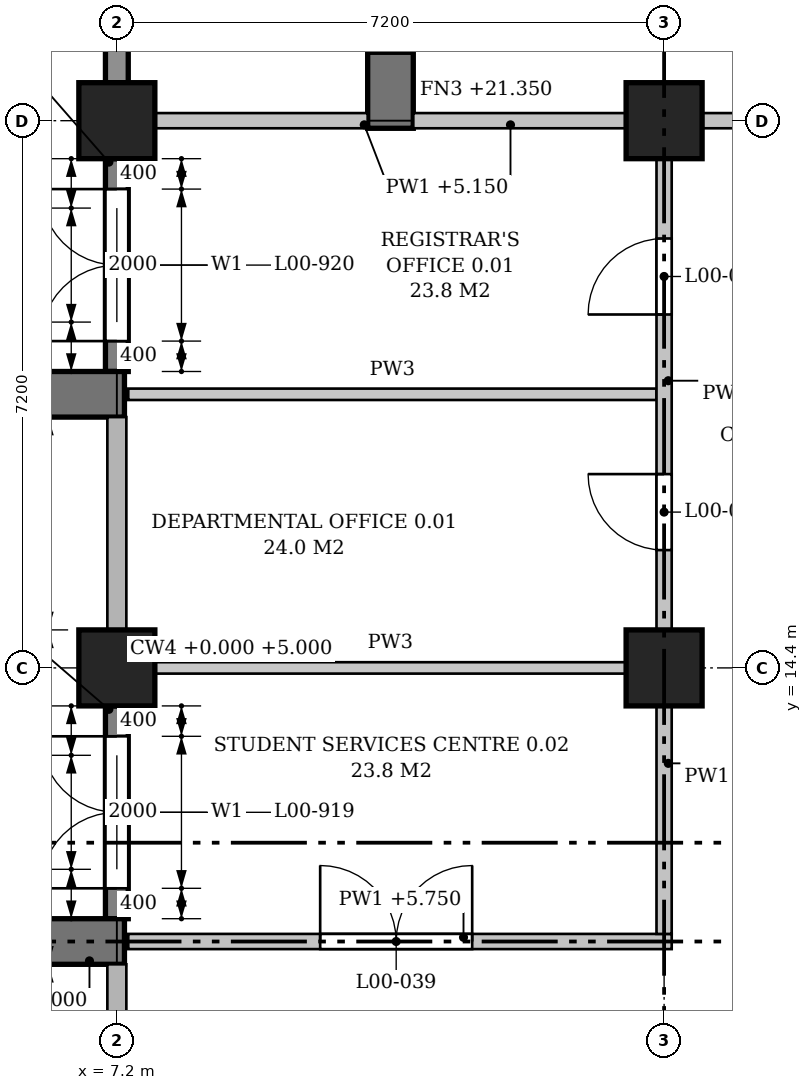
"""IFC4 building model, lengths in metres.
Left out: names, types, materials, properties, quantities, classifications, styles, units other than length and angle.
Written with IfcOpenShell. Run it as: python <this file> out.ifc"""

import sys

from ifc_helpers import new_model, si_unit, direction, frame, frame_2d, origin, origin_2d, place, context, subcontext, project, spatial, polyline, rectangle, outline, extrude, element, fill, save


model = new_model("IFC4")
c1 = context("Model", 3, precision=1e-05, world=origin(), true_north=direction((0.0, 1.0)))
c2 = subcontext(c1, "Body", "Model", "MODEL_VIEW")
j1 = project(units=[si_unit("LENGTHUNIT", "METRE"), si_unit("PLANEANGLEUNIT", "RADIAN")], contexts=[c1])
p1 = place(None, origin())
s1 = spatial("IfcSite", under=j1, at=p1, CompositionType="ELEMENT")
p2 = place(p1, origin())
s2 = spatial("IfcBuilding", under=s1, at=p2, CompositionType="ELEMENT")
p3 = place(p2, origin())
s3 = spatial("IfcBuildingStorey", under=s2, at=p3, CompositionType="ELEMENT", Elevation=0.0)
for number, where, z_axis, x_axis in (
    (1, (7.2, 14.4, 0.0), (0.0, 0.0, 1.0), (1.0, 0.0, 0.0)),
    (2, (7.2, 21.6, 0.0), (0.0, 0.0, 1.0), (1.0, 0.0, 0.0)),
    (3, (14.4, 14.4, 0.0), (0.0, 0.0, 1.0), (1.0, 0.0, 0.0)),
    (4, (14.4, 21.6, 0.0), (0.0, 0.0, 1.0), (1.0, 0.0, 0.0)),
):
    element("IfcColumn", number, at=place(p3, frame(where, z_axis=z_axis, x_axis=x_axis)), inside=s3, PredefinedType="COLUMN", context=c2, shape_type="SweptSolid", body=[
        extrude(rectangle(XDim=1.0, YDim=1.0, at=origin_2d()), origin(), (0.0, 0.0, 1.0), 6.0),
    ])
p4 = place(p3, frame((7.2, 11.1, 0.0), z_axis=(0.0, 0.0, 1.0), x_axis=(0.0, 1.0, 0.0)))
e5 = element("IfcWall", 5, at=p4, inside=s3, PredefinedType="STANDARD", context=c2, shape_type="SweptSolid", body=[
    extrude(rectangle(XDim=2.8, YDim=0.3, at=frame_2d((1.4, 0.0))), origin(), (0.0, 0.0, 1.0), 5.0),
])
p5 = place(p4, frame((0.4, 0.0, 0.0)))
e6 = element("IfcOpeningElement", 6, at=p5, cuts=e5, PredefinedType="OPENING", context=c2, shape_type="SweptSolid", body=[
    extrude(outline(polyline([(0.0, 0.0), (2.0, 0.0), (2.0, 1.9), (1.0, 2.9), (0.0, 1.9), (0.0, 0.0)])), frame((0.0, 0.16, 0.0), z_axis=(0.0, -1.0, 0.0), x_axis=(1.0, 0.0, 0.0)), (0.0, 0.0, 1.0), 0.32),
])
p6 = place(p4, frame((0.65, 0.0, 3.15)))
e7 = element("IfcOpeningElement", 7, at=p6, cuts=e5, PredefinedType="OPENING", context=c2, shape_type="SweptSolid", body=[
    extrude(outline(polyline([(0.0, 0.0), (1.5, 0.0), (1.5, 1.05), (0.75, 1.8), (0.0, 1.05), (0.0, 0.0)])), frame((0.0, 0.16, 0.0), z_axis=(0.0, -1.0, 0.0), x_axis=(1.0, 0.0, 0.0)), (0.0, 0.0, 1.0), 0.32),
])
p7 = place(p3, frame((7.2, 18.3, 0.0), z_axis=(0.0, 0.0, 1.0), x_axis=(0.0, 1.0, 0.0)))
e8 = element("IfcWall", 8, at=p7, inside=s3, PredefinedType="STANDARD", context=c2, shape_type="SweptSolid", body=[
    extrude(rectangle(XDim=2.8, YDim=0.3, at=frame_2d((1.4, 0.0))), origin(), (0.0, 0.0, 1.0), 5.0),
])
p8 = place(p7, frame((0.4, 0.0, 0.0)))
e9 = element("IfcOpeningElement", 9, at=p8, cuts=e8, PredefinedType="OPENING", context=c2, shape_type="SweptSolid", body=[
    extrude(outline(polyline([(0.0, 0.0), (2.0, 0.0), (2.0, 1.9), (1.0, 2.9), (0.0, 1.9), (0.0, 0.0)])), frame((0.0, 0.16, 0.0), z_axis=(0.0, -1.0, 0.0), x_axis=(1.0, 0.0, 0.0)), (0.0, 0.0, 1.0), 0.32),
])
p9 = place(p7, frame((0.65, 0.0, 3.15)))
e10 = element("IfcOpeningElement", 10, at=p9, cuts=e8, PredefinedType="OPENING", context=c2, shape_type="SweptSolid", body=[
    extrude(outline(polyline([(0.0, 0.0), (1.5, 0.0), (1.5, 1.05), (0.75, 1.8), (0.0, 1.05), (0.0, 0.0)])), frame((0.0, 0.16, 0.0), z_axis=(0.0, -1.0, 0.0), x_axis=(1.0, 0.0, 0.0)), (0.0, 0.0, 1.0), 0.32),
])
p10 = place(p3, frame((7.2, 22.1, 0.0), z_axis=(0.0, 0.0, 1.0), x_axis=(0.0, 1.0, 0.0)))
e11 = element("IfcWall", 11, at=p10, inside=s3, PredefinedType="SOLIDWALL", context=c2, shape_type="SweptSolid", body=[
    extrude(rectangle(XDim=2.8, YDim=0.3, at=frame_2d((1.4, 0.0))), origin(), (0.0, 0.0, 1.0), 5.75),
])
p11 = place(p3, frame((10.8, 21.5, 0.0), z_axis=(0.0, 0.0, 1.0), x_axis=(0.0, 1.0, 0.0)))
e12 = element("IfcWall", 12, at=p11, inside=s3, PredefinedType="POLYGONAL", context=c2, shape_type="SweptSolid", body=[
    extrude(outline(polyline([(1.0, 0.0), (1.0, 20.975), (0.75, 21.35), (0.35, 21.35), (0.35, 20.75), (0.0, 20.75), (0.0, 16.8), (0.35, 16.8), (0.35, 15.95), (0.0, 15.95), (0.0, 11.4), (0.35, 11.4), (0.35, 10.55), (0.0, 10.55), (0.0, 6.0), (0.35, 6.0), (0.35, 0.0), (1.0, 0.0)])), frame((0.0, 0.3, 0.0), z_axis=(0.0, -1.0, 0.0), x_axis=(1.0, 0.0, 0.0)), (0.0, 0.0, 1.0), 0.6),
])
for number, where, z_axis, x_axis in (
    (13, (7.3, 10.8, 0.0), (0.0, 0.0, 1.0), (-1.0, 0.0, 0.0)),
    (14, (7.3, 18.0, 0.0), (0.0, 0.0, 1.0), (-1.0, 0.0, 0.0)),
):
    element("IfcWall", number, at=place(p3, frame(where, z_axis=z_axis, x_axis=x_axis)), inside=s3, PredefinedType="POLYGONAL", context=c2, shape_type="SweptSolid", body=[
        extrude(outline(polyline([(1.0, 0.0), (1.0, 5.25), (0.5, 6.0), (0.35, 6.0), (0.35, 5.0), (0.0, 5.0), (0.0, 0.0), (1.0, 0.0)])), frame((0.0, 0.3, 0.0), z_axis=(0.0, -1.0, 0.0), x_axis=(1.0, 0.0, 0.0)), (0.0, 0.0, 1.0), 0.6),
    ])
p12 = place(p3, frame((7.35, 10.8, 0.0), z_axis=(0.0, 0.0, 1.0), x_axis=(1.0, 0.0, 0.0)))
e15 = element("IfcWall", 15, at=p12, inside=s3, PredefinedType="PARTITIONING", context=c2, shape_type="SweptSolid", body=[
    extrude(outline(polyline([(0.0, 0.0), (7.15, 0.0), (7.15, 5.0), (6.8, 5.0), (6.8, 5.75), (0.1, 5.75), (0.1, 5.0), (0.0, 5.0), (0.0, 0.0)])), frame((0.0, 0.1, 0.0), z_axis=(0.0, -1.0, 0.0), x_axis=(1.0, 0.0, 0.0)), (0.0, 0.0, 1.0), 0.2),
])
p13 = place(p12, frame((2.525, 0.0, 0.0)))
e16 = element("IfcOpeningElement", 16, at=p13, cuts=e15, PredefinedType="OPENING", context=c2, shape_type="SweptSolid", body=[
    extrude(rectangle(XDim=2.0, YDim=2.1, at=frame_2d((1.0, 1.05))), frame((0.0, 0.11, 0.0), z_axis=(0.0, -1.0, 0.0), x_axis=(1.0, 0.0, 0.0)), (0.0, 0.0, 1.0), 0.22),
])
p14 = place(p3, frame((7.7, 14.4, 0.0), z_axis=(0.0, 0.0, 1.0), x_axis=(1.0, 0.0, 0.0)))
e17 = element("IfcWall", 17, at=p14, inside=s3, PredefinedType="PARTITIONING", context=c2, shape_type="SweptSolid", body=[
    extrude(rectangle(XDim=6.2, YDim=0.15, at=frame_2d((3.1, 0.0))), origin(), (0.0, 0.0, 1.0), 5.0),
])
p15 = place(p3, frame((7.35, 18.0, 0.0), z_axis=(0.0, 0.0, 1.0), x_axis=(1.0, 0.0, 0.0)))
e18 = element("IfcWall", 18, at=p15, inside=s3, PredefinedType="PARTITIONING", context=c2, shape_type="SweptSolid", body=[
    extrude(rectangle(XDim=6.95, YDim=0.15, at=frame_2d((3.475, 0.0))), origin(), (0.0, 0.0, 1.0), 5.0),
])
p16 = place(p3, frame((7.7, 21.6, 0.0), z_axis=(0.0, 0.0, 1.0), x_axis=(1.0, 0.0, 0.0)))
e19 = element("IfcWall", 19, at=p16, inside=s3, PredefinedType="PARTITIONING", context=c2, shape_type="SweptSolid", body=[
    extrude(rectangle(XDim=2.8, YDim=0.2, at=frame_2d((1.4, 0.0))), origin(), (0.0, 0.0, 1.0), 5.15),
])
p17 = place(p3, frame((11.1, 21.6, 0.0), z_axis=(0.0, 0.0, 1.0), x_axis=(1.0, 0.0, 0.0)))
e20 = element("IfcWall", 20, at=p17, inside=s3, PredefinedType="PARTITIONING", context=c2, shape_type="SweptSolid", body=[
    extrude(rectangle(XDim=2.8, YDim=0.2, at=frame_2d((1.4, 0.0))), origin(), (0.0, 0.0, 1.0), 5.15),
])
p18 = place(p3, frame((14.9, 21.6, 0.0), z_axis=(0.0, 0.0, 1.0), x_axis=(1.0, 0.0, 0.0)))
e21 = element("IfcWall", 21, at=p18, inside=s3, PredefinedType="PARTITIONING", context=c2, shape_type="SweptSolid", body=[
    extrude(rectangle(XDim=2.8, YDim=0.2, at=frame_2d((1.4, 0.0))), origin(), (0.0, 0.0, 1.0), 5.15),
])
p19 = place(p18, frame((0.9, 0.0, 0.0)))
e22 = element("IfcOpeningElement", 22, at=p19, cuts=e21, PredefinedType="OPENING", context=c2, shape_type="SweptSolid", body=[
    extrude(rectangle(XDim=1.0, YDim=2.1, at=frame_2d((0.5, 1.05))), frame((0.0, 0.11, 0.0), z_axis=(0.0, -1.0, 0.0), x_axis=(1.0, 0.0, 0.0)), (0.0, 0.0, 1.0), 0.22),
])
p20 = place(p3, frame((14.4, 10.9, 0.0), z_axis=(0.0, 0.0, 1.0), x_axis=(0.0, 1.0, 0.0)))
e23 = element("IfcWall", 23, at=p20, inside=s3, PredefinedType="PARTITIONING", context=c2, shape_type="SweptSolid", body=[
    extrude(rectangle(XDim=3.0, YDim=0.2, at=frame_2d((1.5, 0.0))), origin(), (0.0, 0.0, 1.0), 5.0),
])
p21 = place(p3, frame((14.4, 14.9, 0.0), z_axis=(0.0, 0.0, 1.0), x_axis=(0.0, 1.0, 0.0)))
e24 = element("IfcWall", 24, at=p21, inside=s3, PredefinedType="PARTITIONING", context=c2, shape_type="SweptSolid", body=[
    extrude(rectangle(XDim=6.2, YDim=0.2, at=frame_2d((3.1, 0.0))), origin(), (0.0, 0.0, 1.0), 5.0),
])
p22 = place(p21, frame((4.15, 0.0, 0.0)))
e25 = element("IfcOpeningElement", 25, at=p22, cuts=e24, PredefinedType="OPENING", context=c2, shape_type="SweptSolid", body=[
    extrude(rectangle(XDim=1.0, YDim=2.1, at=frame_2d((0.5, 1.05))), frame((0.0, 0.11, 0.0), z_axis=(0.0, -1.0, 0.0), x_axis=(1.0, 0.0, 0.0)), (0.0, 0.0, 1.0), 0.22),
])
p23 = place(p21, frame((1.05, 0.0, 0.0)))
e26 = element("IfcOpeningElement", 26, at=p23, cuts=e24, PredefinedType="OPENING", context=c2, shape_type="SweptSolid", body=[
    extrude(rectangle(XDim=1.0, YDim=2.1, at=frame_2d((0.5, 1.05))), frame((0.0, 0.11, 0.0), z_axis=(0.0, -1.0, 0.0), x_axis=(1.0, 0.0, 0.0)), (0.0, 0.0, 1.0), 0.22),
])
p24 = place(p5, origin())
e27 = element("IfcDoor", 27, at=p24, inside=s3, OperationType="DOUBLE_DOOR_SINGLE_SWING", PredefinedType="DOOR", context=c2, shape_type="SweptSolid", body=[
    extrude(outline(polyline([(0.0, 0.0), (2.0, 0.0), (2.0, 1.9), (1.0, 2.9), (0.0, 1.9), (0.0, 0.0)])), frame((0.0, 0.025, 0.0), z_axis=(0.0, -1.0, 0.0), x_axis=(1.0, 0.0, 0.0)), (0.0, 0.0, 1.0), 0.05),
])
fill(e6, e27)
p25 = place(p6, origin())
e28 = element("IfcWindow", 28, at=p25, inside=s3, PartitioningType="SINGLE_PANEL", PredefinedType="WINDOW", context=c2, shape_type="SweptSolid", body=[
    extrude(outline(polyline([(0.0, 0.0), (1.5, 0.0), (1.5, 1.05), (0.75, 1.8), (0.0, 1.05), (0.0, 0.0)])), frame((0.0, 0.03, 0.0), z_axis=(0.0, -1.0, 0.0), x_axis=(1.0, 0.0, 0.0)), (0.0, 0.0, 1.0), 0.06),
])
fill(e7, e28)
p26 = place(p8, origin())
e29 = element("IfcDoor", 29, at=p26, inside=s3, OperationType="DOUBLE_DOOR_SINGLE_SWING", PredefinedType="DOOR", context=c2, shape_type="SweptSolid", body=[
    extrude(outline(polyline([(0.0, 0.0), (2.0, 0.0), (2.0, 1.9), (1.0, 2.9), (0.0, 1.9), (0.0, 0.0)])), frame((0.0, 0.025, 0.0), z_axis=(0.0, -1.0, 0.0), x_axis=(1.0, 0.0, 0.0)), (0.0, 0.0, 1.0), 0.05),
])
fill(e9, e29)
p27 = place(p9, origin())
e30 = element("IfcWindow", 30, at=p27, inside=s3, PartitioningType="SINGLE_PANEL", PredefinedType="WINDOW", context=c2, shape_type="SweptSolid", body=[
    extrude(outline(polyline([(0.0, 0.0), (1.5, 0.0), (1.5, 1.05), (0.75, 1.8), (0.0, 1.05), (0.0, 0.0)])), frame((0.0, 0.03, 0.0), z_axis=(0.0, -1.0, 0.0), x_axis=(1.0, 0.0, 0.0)), (0.0, 0.0, 1.0), 0.06),
])
fill(e10, e30)
p28 = place(p13, origin())
e31 = element("IfcDoor", 31, at=p28, inside=s3, OperationType="DOUBLE_DOOR_SINGLE_SWING", PredefinedType="DOOR", context=c2, shape_type="SweptSolid", body=[
    extrude(rectangle(XDim=2.0, YDim=2.1, at=frame_2d((1.0, 1.05))), frame((0.0, 0.025, 0.0), z_axis=(0.0, -1.0, 0.0), x_axis=(1.0, 0.0, 0.0)), (0.0, 0.0, 1.0), 0.05),
])
fill(e16, e31)
p29 = place(p22, origin())
e32 = element("IfcDoor", 32, at=p29, inside=s3, OperationType="SINGLE_SWING_LEFT", PredefinedType="DOOR", context=c2, shape_type="SweptSolid", body=[
    extrude(rectangle(XDim=1.0, YDim=2.1, at=frame_2d((0.5, 1.05))), frame((0.0, 0.025, 0.0), z_axis=(0.0, -1.0, 0.0), x_axis=(1.0, 0.0, 0.0)), (0.0, 0.0, 1.0), 0.05),
])
fill(e25, e32)
p30 = place(p23, origin())
e33 = element("IfcDoor", 33, at=p30, inside=s3, OperationType="SINGLE_SWING_RIGHT", PredefinedType="DOOR", context=c2, shape_type="SweptSolid", body=[
    extrude(rectangle(XDim=1.0, YDim=2.1, at=frame_2d((0.5, 1.05))), frame((0.0, 0.025, 0.0), z_axis=(0.0, -1.0, 0.0), x_axis=(1.0, 0.0, 0.0)), (0.0, 0.0, 1.0), 0.05),
])
fill(e26, e33)
save(model, sys.argv[1])
